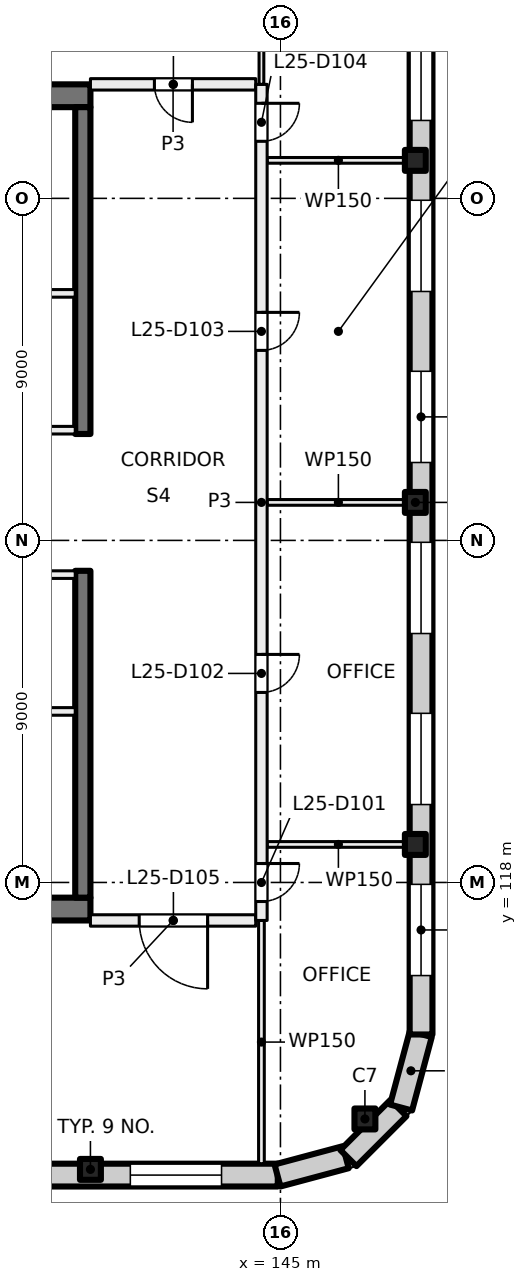
"""IFC4 building model, lengths in metres.
Left out: names, types, materials, properties, quantities, classifications, styles, units other than length and angle.
Written with IfcOpenShell. Run it as: python <this file> out.ifc"""

import sys

from ifc_helpers import new_model, si_unit, direction, frame, frame_2d, origin, origin_2d, place, context, subcontext, project, spatial, rectangle, extrude, element, fill, save


model = new_model("IFC4")
c1 = context("Model", 3, precision=1e-05, world=origin(), true_north=direction((0.0, 1.0)))
c2 = subcontext(c1, "Body", "Model", "MODEL_VIEW")
j1 = project(units=[si_unit("LENGTHUNIT", "METRE"), si_unit("PLANEANGLEUNIT", "RADIAN")], contexts=[c1])
p1 = place(None, origin())
s1 = spatial("IfcSite", under=j1, at=p1, CompositionType="ELEMENT")
p2 = place(p1, origin())
s2 = spatial("IfcBuilding", under=s1, at=p2, CompositionType="ELEMENT")
p3 = place(p2, frame((0.0, 0.0, 109.0)))
s3 = spatial("IfcBuildingStorey", under=s2, at=p3, CompositionType="ELEMENT", Elevation=109.0)
for number, where, z_axis, x_axis in (
    (1, (148.55, 119.0, 0.0), (0.0, 0.0, 1.0), (1.0, 0.0, 0.0)),
    (2, (148.55, 128.0, 0.0), (0.0, 0.0, 1.0), (1.0, 0.0, 0.0)),
    (3, (148.55, 137.0, 0.0), (0.0, 0.0, 1.0), (1.0, 0.0, 0.0)),
    (4, (140.0, 110.45, 0.0), (0.0, 0.0, 1.0), (1.0, 0.0, 0.0)),
    (5, (147.223, 111.777, 0.0), (0.0, 0.0, 1.0), (1.0, 0.0, 0.0)),
):
    element("IfcColumn", number, at=place(p3, frame(where, z_axis=z_axis, x_axis=x_axis)), inside=s3, PredefinedType="COLUMN", context=c2, shape_type="SweptSolid", body=[
        extrude(rectangle(XDim=0.55, YDim=0.55, at=origin_2d()), origin(), (0.0, 0.0, 1.0), 4.0),
    ])
for number, where, z_axis, x_axis in (
    (6, (135.4, 117.3, 0.0), (0.0, 0.0, 1.0), (1.0, 0.0, 0.0)),
    (7, (135.4, 138.7, 0.0), (0.0, 0.0, 1.0), (1.0, 0.0, 0.0)),
):
    element("IfcWall", number, at=place(p3, frame(where, z_axis=z_axis, x_axis=x_axis)), inside=s3, PredefinedType="SHEAR", context=c2, shape_type="SweptSolid", body=[
        extrude(rectangle(XDim=4.6, YDim=0.6, at=frame_2d((2.3, 0.0))), origin(), (0.0, 0.0, 1.0), 4.0),
    ])
for number, where, z_axis, x_axis in (
    (8, (139.8, 117.6, 0.0), (0.0, 0.0, 1.0), (0.0, 1.0, 0.0)),
    (9, (139.8, 129.8, 0.0), (0.0, 0.0, 1.0), (0.0, 1.0, 0.0)),
):
    element("IfcWall", number, at=place(p3, frame(where, z_axis=z_axis, x_axis=x_axis)), inside=s3, PredefinedType="SHEAR", context=c2, shape_type="SweptSolid", body=[
        extrude(rectangle(XDim=8.6, YDim=0.4, at=frame_2d((4.3, 0.0))), origin(), (0.0, 0.0, 1.0), 4.0),
    ])
p4 = place(p3, frame((144.93, 110.3, 0.0), z_axis=(0.0, 0.0, 1.0), x_axis=(-1.0, 0.0, 0.0)))
e10 = element("IfcWall", 10, at=p4, inside=s3, PredefinedType="SOLIDWALL", context=c2, shape_type="SweptSolid", body=[
    extrude(rectangle(XDim=13.93, YDim=0.6, at=frame_2d((6.965, 0.0))), origin(), (0.0, 0.0, 1.0), 3.625),
])
p5 = place(p4, frame((1.48, 0.0, 0.9)))
e11 = element("IfcOpeningElement", 11, at=p5, cuts=e10, PredefinedType="OPENING", context=c2, shape_type="SweptSolid", body=[
    extrude(rectangle(XDim=2.4, YDim=2.4, at=frame_2d((1.2, 1.2))), frame((0.0, 0.31, 0.0), z_axis=(0.0, -1.0, 0.0), x_axis=(1.0, 0.0, 0.0)), (0.0, 0.0, 1.0), 0.62),
])
p6 = place(p4, frame((5.98, 0.0, 0.9)))
e12 = element("IfcOpeningElement", 12, at=p6, cuts=e10, PredefinedType="OPENING", context=c2, shape_type="SweptSolid", body=[
    extrude(rectangle(XDim=2.4, YDim=2.4, at=frame_2d((1.2, 1.2))), frame((0.0, 0.31, 0.0), z_axis=(0.0, -1.0, 0.0), x_axis=(1.0, 0.0, 0.0)), (0.0, 0.0, 1.0), 0.62),
])
p7 = place(p4, frame((10.48, 0.0, 0.9)))
e13 = element("IfcOpeningElement", 13, at=p7, cuts=e10, PredefinedType="OPENING", context=c2, shape_type="SweptSolid", body=[
    extrude(rectangle(XDim=2.4, YDim=2.4, at=frame_2d((1.2, 1.2))), frame((0.0, 0.31, 0.0), z_axis=(0.0, -1.0, 0.0), x_axis=(1.0, 0.0, 0.0)), (0.0, 0.0, 1.0), 0.62),
])
for number, where, z_axis, x_axis in (
    (14, (146.719, 110.771, 0.0), (0.0, 0.0, 1.0), (-0.966, -0.259, 0.0)),
    (15, (148.104, 112.064, 0.0), (0.0, 0.0, 1.0), (-0.707, -0.707, 0.0)),
):
    element("IfcWall", number, at=place(p3, frame(where, z_axis=z_axis, x_axis=x_axis)), inside=s3, PredefinedType="SOLIDWALL", context=c2, shape_type="SweptSolid", body=[
        extrude(rectangle(XDim=1.861, YDim=0.6, at=frame_2d((0.93, 0.0))), origin(), (0.0, 0.0, 1.0), 3.625),
    ])
p8 = place(p3, frame((148.692, 114.01, 0.0), z_axis=(0.0, 0.0, 1.0), x_axis=(-0.258839784042, -0.965920269068, 0.0)))
e16 = element("IfcWall", 16, at=p8, inside=s3, PredefinedType="SOLIDWALL", context=c2, shape_type="SweptSolid", body=[
    extrude(rectangle(XDim=2.0, YDim=0.6, at=frame_2d((1.0, 0.0))), origin(), (0.0, 0.0, 1.0), 3.625),
])
p9 = place(p3, frame((148.7, 141.93, 0.0), z_axis=(0.0, 0.0, 1.0), x_axis=(0.0, -1.0, 0.0)))
e17 = element("IfcWall", 17, at=p9, inside=s3, PredefinedType="SOLIDWALL", context=c2, shape_type="SweptSolid", body=[
    extrude(rectangle(XDim=27.93, YDim=0.6, at=frame_2d((13.965, 0.0))), origin(), (0.0, 0.0, 1.0), 3.625),
])
p10 = place(p9, frame((1.48, 0.0, 0.9)))
e18 = element("IfcOpeningElement", 18, at=p10, cuts=e17, PredefinedType="OPENING", context=c2, shape_type="SweptSolid", body=[
    extrude(rectangle(XDim=2.4, YDim=2.4, at=frame_2d((1.2, 1.2))), frame((0.0, 0.31, 0.0), z_axis=(0.0, -1.0, 0.0), x_axis=(1.0, 0.0, 0.0)), (0.0, 0.0, 1.0), 0.62),
])
p11 = place(p9, frame((5.98, 0.0, 0.9)))
e19 = element("IfcOpeningElement", 19, at=p11, cuts=e17, PredefinedType="OPENING", context=c2, shape_type="SweptSolid", body=[
    extrude(rectangle(XDim=2.4, YDim=2.4, at=frame_2d((1.2, 1.2))), frame((0.0, 0.31, 0.0), z_axis=(0.0, -1.0, 0.0), x_axis=(1.0, 0.0, 0.0)), (0.0, 0.0, 1.0), 0.62),
])
p12 = place(p9, frame((10.48, 0.0, 0.9)))
e20 = element("IfcOpeningElement", 20, at=p12, cuts=e17, PredefinedType="OPENING", context=c2, shape_type="SweptSolid", body=[
    extrude(rectangle(XDim=2.4, YDim=2.4, at=frame_2d((1.2, 1.2))), frame((0.0, 0.31, 0.0), z_axis=(0.0, -1.0, 0.0), x_axis=(1.0, 0.0, 0.0)), (0.0, 0.0, 1.0), 0.62),
])
p13 = place(p9, frame((14.98, 0.0, 0.9)))
e21 = element("IfcOpeningElement", 21, at=p13, cuts=e17, PredefinedType="OPENING", context=c2, shape_type="SweptSolid", body=[
    extrude(rectangle(XDim=2.4, YDim=2.4, at=frame_2d((1.2, 1.2))), frame((0.0, 0.31, 0.0), z_axis=(0.0, -1.0, 0.0), x_axis=(1.0, 0.0, 0.0)), (0.0, 0.0, 1.0), 0.62),
])
p14 = place(p9, frame((19.48, 0.0, 0.9)))
e22 = element("IfcOpeningElement", 22, at=p14, cuts=e17, PredefinedType="OPENING", context=c2, shape_type="SweptSolid", body=[
    extrude(rectangle(XDim=2.4, YDim=2.4, at=frame_2d((1.2, 1.2))), frame((0.0, 0.31, 0.0), z_axis=(0.0, -1.0, 0.0), x_axis=(1.0, 0.0, 0.0)), (0.0, 0.0, 1.0), 0.62),
])
p15 = place(p9, frame((23.98, 0.0, 0.9)))
e23 = element("IfcOpeningElement", 23, at=p15, cuts=e17, PredefinedType="OPENING", context=c2, shape_type="SweptSolid", body=[
    extrude(rectangle(XDim=2.4, YDim=2.4, at=frame_2d((1.2, 1.2))), frame((0.0, 0.31, 0.0), z_axis=(0.0, -1.0, 0.0), x_axis=(1.0, 0.0, 0.0)), (0.0, 0.0, 1.0), 0.62),
])
p16 = place(p3, frame((135.0, 129.9, 0.0), z_axis=(0.0, 0.0, 1.0), x_axis=(1.0, 0.0, 0.0)))
e24 = element("IfcWall", 24, at=p16, inside=s3, PredefinedType="PARTITIONING", context=c2, shape_type="SweptSolid", body=[
    extrude(rectangle(XDim=4.6, YDim=0.2, at=frame_2d((2.3, 0.0))), origin(), (0.0, 0.0, 1.0), 3.625),
])
p17 = place(p16, frame((1.7, 0.0, 0.0)))
e25 = element("IfcOpeningElement", 25, at=p17, cuts=e24, PredefinedType="OPENING", context=c2, shape_type="SweptSolid", body=[
    extrude(rectangle(XDim=1.2, YDim=2.1, at=frame_2d((0.6, 1.05))), frame((0.0, 0.11, 0.0), z_axis=(0.0, -1.0, 0.0), x_axis=(1.0, 0.0, 0.0)), (0.0, 0.0, 1.0), 0.22),
])
p18 = place(p3, frame((135.0, 133.5, 0.0), z_axis=(0.0, 0.0, 1.0), x_axis=(1.0, 0.0, 0.0)))
e26 = element("IfcWall", 26, at=p18, inside=s3, PredefinedType="PARTITIONING", context=c2, shape_type="SweptSolid", body=[
    extrude(rectangle(XDim=4.6, YDim=0.2, at=frame_2d((2.3, 0.0))), origin(), (0.0, 0.0, 1.0), 3.625),
])
p19 = place(p18, frame((1.75, 0.0, 0.0)))
e27 = element("IfcOpeningElement", 27, at=p19, cuts=e26, PredefinedType="OPENING", context=c2, shape_type="SweptSolid", body=[
    extrude(rectangle(XDim=1.5, YDim=2.1, at=frame_2d((0.75, 1.05))), frame((0.0, 0.11, 0.0), z_axis=(0.0, -1.0, 0.0), x_axis=(1.0, 0.0, 0.0)), (0.0, 0.0, 1.0), 0.22),
])
p20 = place(p3, frame((139.6, 126.1, 0.0), z_axis=(0.0, 0.0, 1.0), x_axis=(-1.0, 0.0, 0.0)))
e28 = element("IfcWall", 28, at=p20, inside=s3, PredefinedType="PARTITIONING", context=c2, shape_type="SweptSolid", body=[
    extrude(rectangle(XDim=4.6, YDim=0.2, at=frame_2d((2.3, 0.0))), origin(), (0.0, 0.0, 1.0), 3.625),
])
p21 = place(p20, frame((1.7, 0.0, 0.0)))
e29 = element("IfcOpeningElement", 29, at=p21, cuts=e28, PredefinedType="OPENING", context=c2, shape_type="SweptSolid", body=[
    extrude(rectangle(XDim=1.2, YDim=2.1, at=frame_2d((0.6, 1.05))), frame((0.0, 0.11, 0.0), z_axis=(0.0, -1.0, 0.0), x_axis=(1.0, 0.0, 0.0)), (0.0, 0.0, 1.0), 0.22),
])
p22 = place(p3, frame((139.6, 122.5, 0.0), z_axis=(0.0, 0.0, 1.0), x_axis=(-1.0, 0.0, 0.0)))
e30 = element("IfcWall", 30, at=p22, inside=s3, PredefinedType="PARTITIONING", context=c2, shape_type="SweptSolid", body=[
    extrude(rectangle(XDim=4.6, YDim=0.2, at=frame_2d((2.3, 0.0))), origin(), (0.0, 0.0, 1.0), 3.625),
])
p23 = place(p22, frame((1.35, 0.0, 0.0)))
e31 = element("IfcOpeningElement", 31, at=p23, cuts=e30, PredefinedType="OPENING", context=c2, shape_type="SweptSolid", body=[
    extrude(rectangle(XDim=1.5, YDim=2.1, at=frame_2d((0.75, 1.05))), frame((0.0, 0.11, 0.0), z_axis=(0.0, -1.0, 0.0), x_axis=(1.0, 0.0, 0.0)), (0.0, 0.0, 1.0), 0.22),
])
p24 = place(p3, frame((144.35, 139.0, 0.0), z_axis=(0.0, 0.0, 1.0), x_axis=(-1.0, 0.0, 0.0)))
e32 = element("IfcWall", 32, at=p24, inside=s3, PredefinedType="PARTITIONING", context=c2, shape_type="SweptSolid", body=[
    extrude(rectangle(XDim=4.35, YDim=0.3, at=frame_2d((2.175, 0.0))), origin(), (0.0, 0.0, 1.0), 3.625),
])
p25 = place(p24, frame((1.667, 0.0, 0.0)))
e33 = element("IfcOpeningElement", 33, at=p25, cuts=e32, PredefinedType="OPENING", context=c2, shape_type="SweptSolid", body=[
    extrude(rectangle(XDim=1.0, YDim=2.1, at=frame_2d((0.5, 1.05))), frame((0.0, 0.16, 0.0), z_axis=(0.0, -1.0, 0.0), x_axis=(1.0, 0.0, 0.0)), (0.0, 0.0, 1.0), 0.32),
])
p26 = place(p3, frame((144.35, 117.0, 0.0), z_axis=(0.0, 0.0, 1.0), x_axis=(-1.0, 0.0, 0.0)))
e34 = element("IfcWall", 34, at=p26, inside=s3, PredefinedType="PARTITIONING", context=c2, shape_type="SweptSolid", body=[
    extrude(rectangle(XDim=4.35, YDim=0.3, at=frame_2d((2.175, 0.0))), origin(), (0.0, 0.0, 1.0), 3.625),
])
p27 = place(p26, frame((1.267, 0.0, 0.0)))
e35 = element("IfcOpeningElement", 35, at=p27, cuts=e34, PredefinedType="OPENING", context=c2, shape_type="SweptSolid", body=[
    extrude(rectangle(XDim=1.8, YDim=2.1, at=frame_2d((0.9, 1.05))), frame((0.0, 0.16, 0.0), z_axis=(0.0, -1.0, 0.0), x_axis=(1.0, 0.0, 0.0)), (0.0, 0.0, 1.0), 0.32),
])
p28 = place(p3, frame((144.5, 117.0, 0.0), z_axis=(0.0, 0.0, 1.0), x_axis=(0.0, -1.0, 0.0)))
e36 = element("IfcWall", 36, at=p28, inside=s3, PredefinedType="PARTITIONING", context=c2, shape_type="SweptSolid", body=[
    extrude(rectangle(XDim=6.4, YDim=0.15, at=frame_2d((3.2, 0.0))), origin(), (0.0, 0.0, 1.0), 3.625),
])
for number, where, z_axis, x_axis in (
    (37, (144.65, 119.0, 0.0), (0.0, 0.0, 1.0), (1.0, 0.0, 0.0)),
    (38, (144.65, 128.0, 0.0), (0.0, 0.0, 1.0), (1.0, 0.0, 0.0)),
    (39, (144.65, 137.0, 0.0), (0.0, 0.0, 1.0), (1.0, 0.0, 0.0)),
):
    element("IfcWall", number, at=place(p3, frame(where, z_axis=z_axis, x_axis=x_axis)), inside=s3, PredefinedType="PARTITIONING", context=c2, shape_type="SweptSolid", body=[
        extrude(rectangle(XDim=3.75, YDim=0.15, at=frame_2d((1.875, 0.0))), origin(), (0.0, 0.0, 1.0), 3.625),
    ])
p29 = place(p3, frame((144.5, 139.0, 0.0), z_axis=(0.0, 0.0, 1.0), x_axis=(0.0, -1.0, 0.0)))
e40 = element("IfcWall", 40, at=p29, inside=s3, PredefinedType="PARTITIONING", context=c2, shape_type="SweptSolid", body=[
    extrude(rectangle(XDim=22.0, YDim=0.3, at=frame_2d((11.0, 0.0))), origin(), (0.0, 0.0, 1.0), 3.625),
])
p30 = place(p29, frame((20.501, 0.0, 0.0)))
e41 = element("IfcOpeningElement", 41, at=p30, cuts=e40, PredefinedType="OPENING", context=c2, shape_type="SweptSolid", body=[
    extrude(rectangle(XDim=1.0, YDim=2.1, at=frame_2d((0.5, 1.05))), frame((0.0, 0.16, 0.0), z_axis=(0.0, -1.0, 0.0), x_axis=(1.0, 0.0, 0.0)), (0.0, 0.0, 1.0), 0.32),
])
p31 = place(p29, frame((15.0, 0.0, 0.0)))
e42 = element("IfcOpeningElement", 42, at=p31, cuts=e40, PredefinedType="OPENING", context=c2, shape_type="SweptSolid", body=[
    extrude(rectangle(XDim=1.0, YDim=2.1, at=frame_2d((0.5, 1.05))), frame((0.0, 0.16, 0.0), z_axis=(0.0, -1.0, 0.0), x_axis=(1.0, 0.0, 0.0)), (0.0, 0.0, 1.0), 0.32),
])
p32 = place(p29, frame((6.0, 0.0, 0.0)))
e43 = element("IfcOpeningElement", 43, at=p32, cuts=e40, PredefinedType="OPENING", context=c2, shape_type="SweptSolid", body=[
    extrude(rectangle(XDim=1.0, YDim=2.1, at=frame_2d((0.5, 1.05))), frame((0.0, 0.16, 0.0), z_axis=(0.0, -1.0, 0.0), x_axis=(1.0, 0.0, 0.0)), (0.0, 0.0, 1.0), 0.32),
])
p33 = place(p29, frame((0.499, 0.0, 0.0)))
e44 = element("IfcOpeningElement", 44, at=p33, cuts=e40, PredefinedType="OPENING", context=c2, shape_type="SweptSolid", body=[
    extrude(rectangle(XDim=1.0, YDim=2.1, at=frame_2d((0.5, 1.05))), frame((0.0, 0.16, 0.0), z_axis=(0.0, -1.0, 0.0), x_axis=(1.0, 0.0, 0.0)), (0.0, 0.0, 1.0), 0.32),
])
p34 = place(p3, frame((144.5, 141.8, 0.0), z_axis=(0.0, 0.0, 1.0), x_axis=(0.0, -1.0, 0.0)))
e45 = element("IfcWall", 45, at=p34, inside=s3, PredefinedType="PARTITIONING", context=c2, shape_type="SweptSolid", body=[
    extrude(rectangle(XDim=2.8, YDim=0.125, at=frame_2d((1.4, 0.0))), origin(), (0.0, 0.0, 1.0), 3.625),
])
p35 = place(p5, origin())
e46 = element("IfcWindow", 46, at=p35, inside=s3, PartitioningType="SINGLE_PANEL", PredefinedType="WINDOW", context=c2, shape_type="SweptSolid", body=[
    extrude(rectangle(XDim=2.4, YDim=2.4, at=frame_2d((1.2, 1.2))), frame((0.0, 0.03, 0.0), z_axis=(0.0, -1.0, 0.0), x_axis=(1.0, 0.0, 0.0)), (0.0, 0.0, 1.0), 0.06),
])
fill(e11, e46)
p36 = place(p10, origin())
e47 = element("IfcWindow", 47, at=p36, inside=s3, PartitioningType="SINGLE_PANEL", PredefinedType="WINDOW", context=c2, shape_type="SweptSolid", body=[
    extrude(rectangle(XDim=2.4, YDim=2.4, at=frame_2d((1.2, 1.2))), frame((0.0, 0.03, 0.0), z_axis=(0.0, -1.0, 0.0), x_axis=(1.0, 0.0, 0.0)), (0.0, 0.0, 1.0), 0.06),
])
fill(e18, e47)
p37 = place(p11, origin())
e48 = element("IfcWindow", 48, at=p37, inside=s3, PartitioningType="SINGLE_PANEL", PredefinedType="WINDOW", context=c2, shape_type="SweptSolid", body=[
    extrude(rectangle(XDim=2.4, YDim=2.4, at=frame_2d((1.2, 1.2))), frame((0.0, 0.03, 0.0), z_axis=(0.0, -1.0, 0.0), x_axis=(1.0, 0.0, 0.0)), (0.0, 0.0, 1.0), 0.06),
])
fill(e19, e48)
p38 = place(p12, origin())
e49 = element("IfcWindow", 49, at=p38, inside=s3, PartitioningType="SINGLE_PANEL", PredefinedType="WINDOW", context=c2, shape_type="SweptSolid", body=[
    extrude(rectangle(XDim=2.4, YDim=2.4, at=frame_2d((1.2, 1.2))), frame((0.0, 0.03, 0.0), z_axis=(0.0, -1.0, 0.0), x_axis=(1.0, 0.0, 0.0)), (0.0, 0.0, 1.0), 0.06),
])
fill(e20, e49)
p39 = place(p13, origin())
e50 = element("IfcWindow", 50, at=p39, inside=s3, PartitioningType="SINGLE_PANEL", PredefinedType="WINDOW", context=c2, shape_type="SweptSolid", body=[
    extrude(rectangle(XDim=2.4, YDim=2.4, at=frame_2d((1.2, 1.2))), frame((0.0, 0.03, 0.0), z_axis=(0.0, -1.0, 0.0), x_axis=(1.0, 0.0, 0.0)), (0.0, 0.0, 1.0), 0.06),
])
fill(e21, e50)
p40 = place(p14, origin())
e51 = element("IfcWindow", 51, at=p40, inside=s3, PartitioningType="SINGLE_PANEL", PredefinedType="WINDOW", context=c2, shape_type="SweptSolid", body=[
    extrude(rectangle(XDim=2.4, YDim=2.4, at=frame_2d((1.2, 1.2))), frame((0.0, 0.03, 0.0), z_axis=(0.0, -1.0, 0.0), x_axis=(1.0, 0.0, 0.0)), (0.0, 0.0, 1.0), 0.06),
])
fill(e22, e51)
p41 = place(p15, origin())
e52 = element("IfcWindow", 52, at=p41, inside=s3, PartitioningType="SINGLE_PANEL", PredefinedType="WINDOW", context=c2, shape_type="SweptSolid", body=[
    extrude(rectangle(XDim=2.4, YDim=2.4, at=frame_2d((1.2, 1.2))), frame((0.0, 0.03, 0.0), z_axis=(0.0, -1.0, 0.0), x_axis=(1.0, 0.0, 0.0)), (0.0, 0.0, 1.0), 0.06),
])
fill(e23, e52)
p42 = place(p30, origin())
e53 = element("IfcDoor", 53, at=p42, inside=s3, OperationType="SINGLE_SWING_LEFT", PredefinedType="DOOR", context=c2, shape_type="SweptSolid", body=[
    extrude(rectangle(XDim=1.0, YDim=2.1, at=frame_2d((0.5, 1.05))), frame((0.0, 0.025, 0.0), z_axis=(0.0, -1.0, 0.0), x_axis=(1.0, 0.0, 0.0)), (0.0, 0.0, 1.0), 0.05),
])
fill(e41, e53)
p43 = place(p31, origin())
e54 = element("IfcDoor", 54, at=p43, inside=s3, OperationType="SINGLE_SWING_LEFT", PredefinedType="DOOR", context=c2, shape_type="SweptSolid", body=[
    extrude(rectangle(XDim=1.0, YDim=2.1, at=frame_2d((0.5, 1.05))), frame((0.0, 0.025, 0.0), z_axis=(0.0, -1.0, 0.0), x_axis=(1.0, 0.0, 0.0)), (0.0, 0.0, 1.0), 0.05),
])
fill(e42, e54)
p44 = place(p32, origin())
e55 = element("IfcDoor", 55, at=p44, inside=s3, OperationType="SINGLE_SWING_LEFT", PredefinedType="DOOR", context=c2, shape_type="SweptSolid", body=[
    extrude(rectangle(XDim=1.0, YDim=2.1, at=frame_2d((0.5, 1.05))), frame((0.0, 0.025, 0.0), z_axis=(0.0, -1.0, 0.0), x_axis=(1.0, 0.0, 0.0)), (0.0, 0.0, 1.0), 0.05),
])
fill(e43, e55)
p45 = place(p33, origin())
e56 = element("IfcDoor", 56, at=p45, inside=s3, OperationType="SINGLE_SWING_LEFT", PredefinedType="DOOR", context=c2, shape_type="SweptSolid", body=[
    extrude(rectangle(XDim=1.0, YDim=2.1, at=frame_2d((0.5, 1.05))), frame((0.0, 0.025, 0.0), z_axis=(0.0, -1.0, 0.0), x_axis=(1.0, 0.0, 0.0)), (0.0, 0.0, 1.0), 0.05),
])
fill(e44, e56)
p46 = place(p27, origin())
e57 = element("IfcDoor", 57, at=p46, inside=s3, OperationType="DOUBLE_DOOR_SINGLE_SWING", PredefinedType="DOOR", context=c2, shape_type="SweptSolid", body=[
    extrude(rectangle(XDim=1.8, YDim=2.1, at=frame_2d((0.9, 1.05))), frame((0.0, 0.025, 0.0), z_axis=(0.0, -1.0, 0.0), x_axis=(1.0, 0.0, 0.0)), (0.0, 0.0, 1.0), 0.05),
])
fill(e35, e57)
p47 = place(p25, origin())
e58 = element("IfcDoor", 58, at=p47, inside=s3, OperationType="SINGLE_SWING_LEFT", PredefinedType="DOOR", context=c2, shape_type="SweptSolid", body=[
    extrude(rectangle(XDim=1.0, YDim=2.1, at=frame_2d((0.5, 1.05))), frame((0.0, 0.025, 0.0), z_axis=(0.0, -1.0, 0.0), x_axis=(1.0, 0.0, 0.0)), (0.0, 0.0, 1.0), 0.05),
])
fill(e33, e58)
save(model, sys.argv[1])
